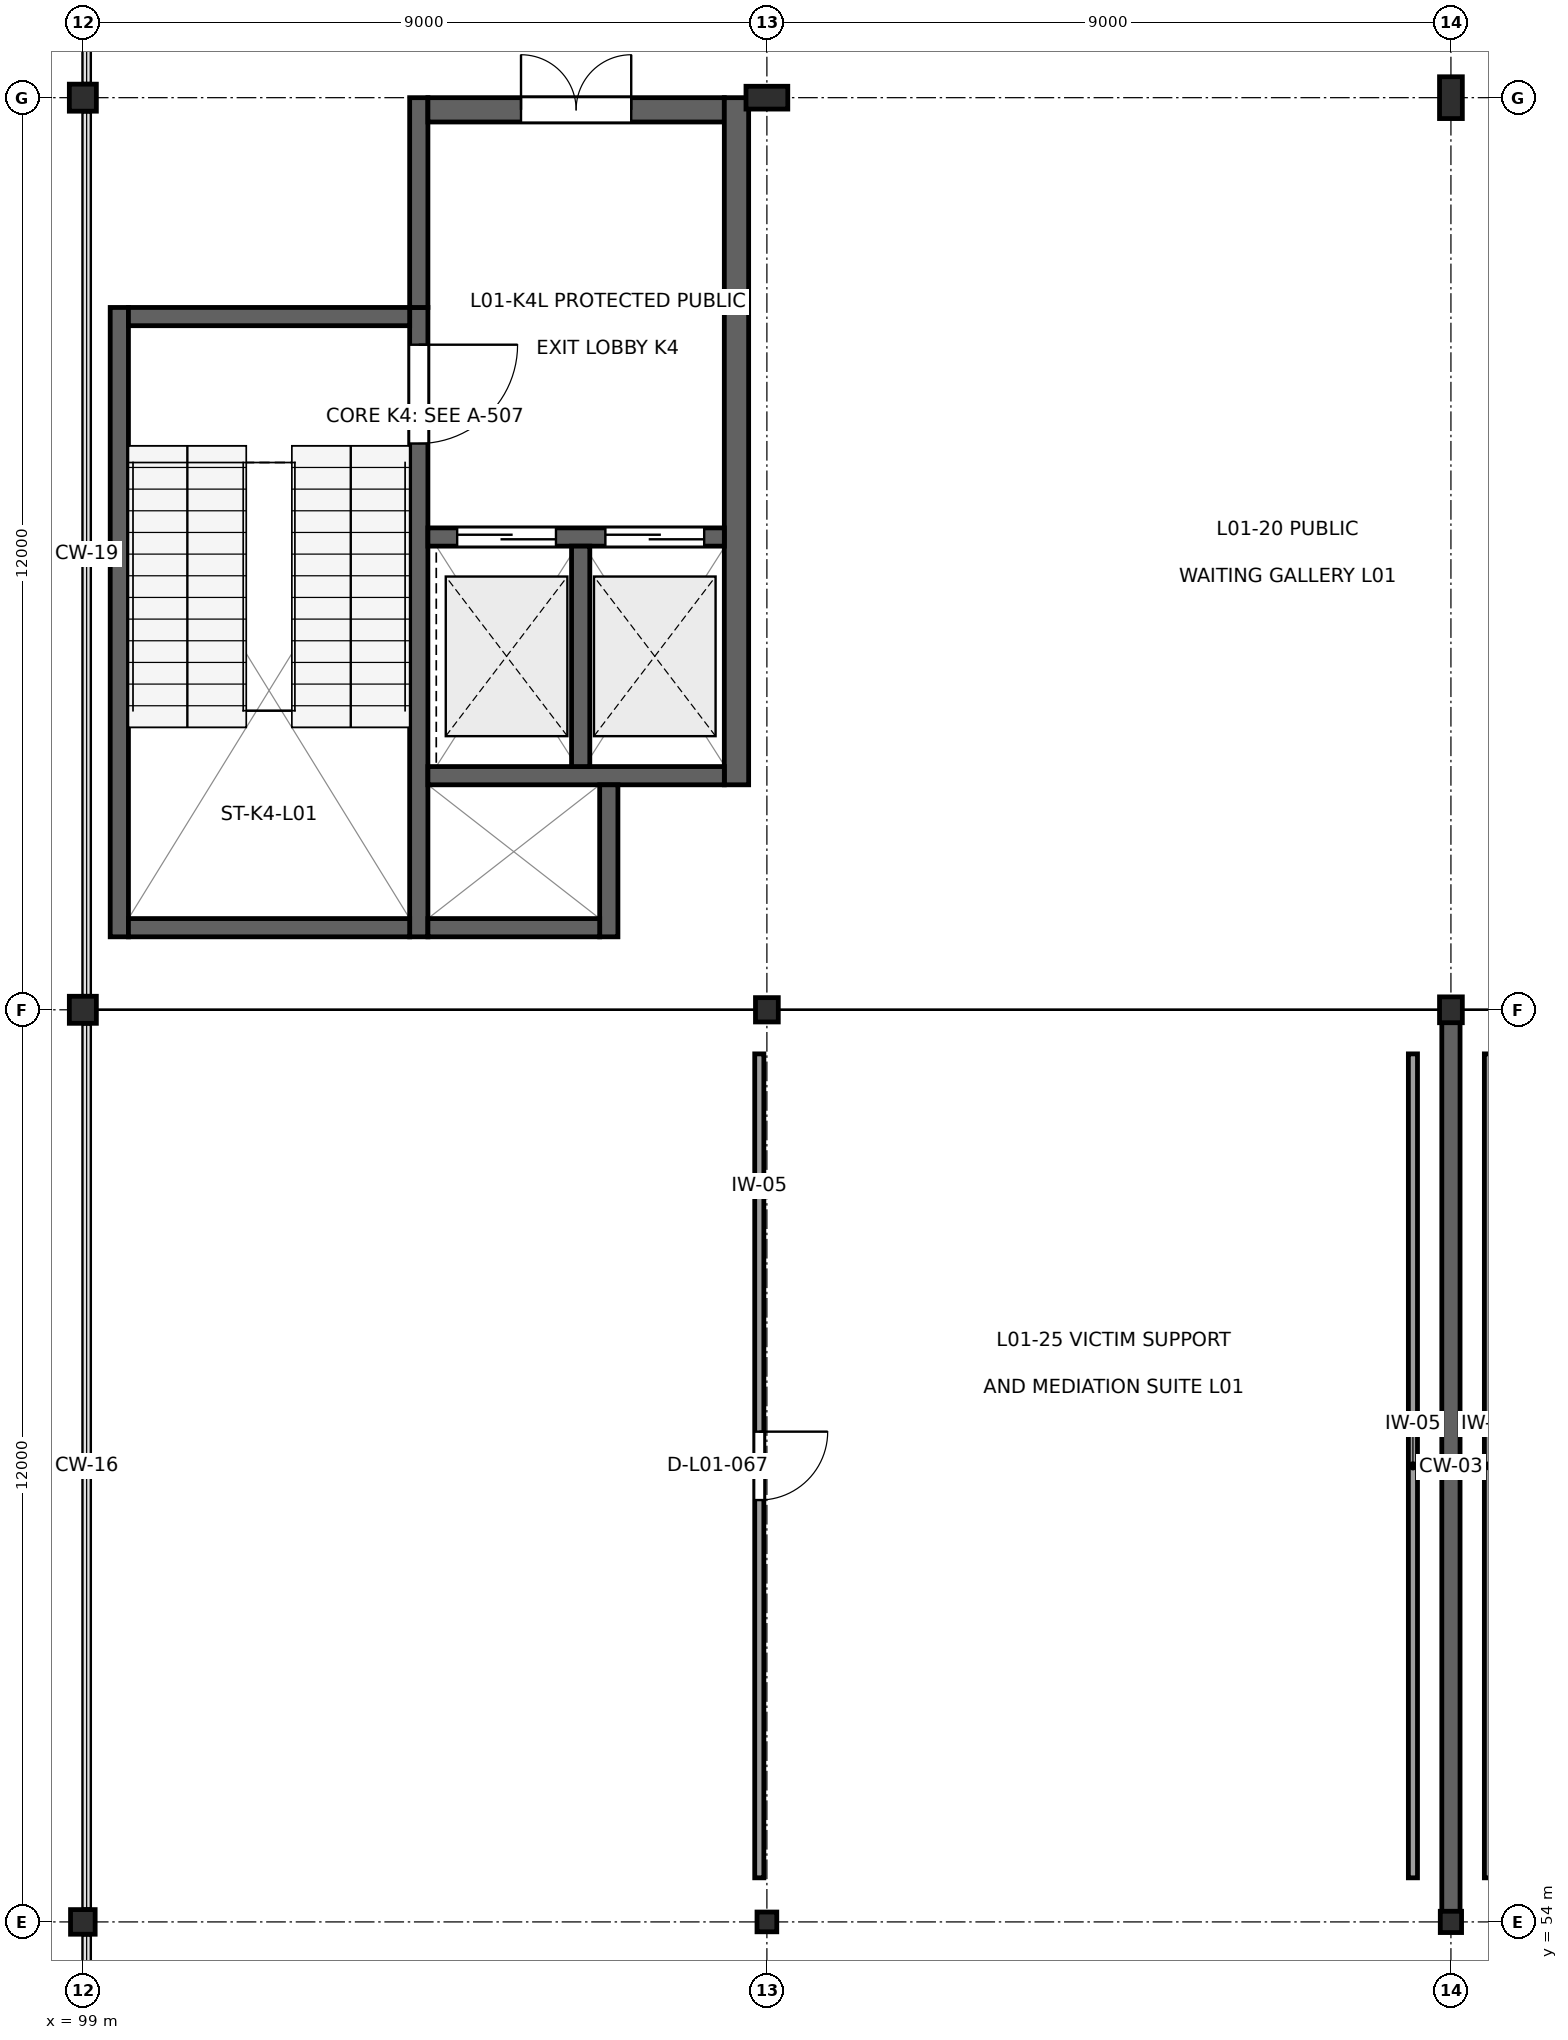
"""IFC4 building model, lengths in metres.
Left out: names, types, materials, properties, quantities, classifications, styles, units other than length and angle.
Written with IfcOpenShell. Run it as: python <this file> out.ifc"""

import sys

from ifc_helpers import new_model, si_unit, direction, frame, frame_2d, origin, origin_2d, place, context, subcontext, project, spatial, rectangle, hollow_circle, i_section, extrude, element, fill, save


model = new_model("IFC4")
c1 = context("Model", 3, precision=1e-05, world=origin(), true_north=direction((0.0, 1.0)))
c2 = subcontext(c1, "Body", "Model", "MODEL_VIEW")
j1 = project(units=[si_unit("LENGTHUNIT", "METRE"), si_unit("PLANEANGLEUNIT", "RADIAN")], contexts=[c1])
p1 = place(None, origin())
s1 = spatial("IfcSite", under=j1, at=p1, CompositionType="ELEMENT")
p2 = place(p1, origin())
s2 = spatial("IfcBuilding", under=s1, at=p2, CompositionType="ELEMENT")
p3 = place(p2, frame((0.0, 0.0, 5.4)))
s3 = spatial("IfcBuildingStorey", under=s2, at=p3, CompositionType="ELEMENT", Elevation=5.4)
p4 = place(p3, frame((99.0, 54.0, 0.0), z_axis=(0.0, 0.0, 1.0), x_axis=(1.0, 0.0, 0.0)))
e1 = element("IfcColumn", 1, at=p4, inside=s3, PredefinedType="PILASTER", context=c2, shape_type="SweptSolid", body=[
    extrude(hollow_circle(Radius=0.162, WallThickness=0.012, at=origin_2d()), origin(), (0.0, 0.0, 1.0), 4.5),
])
for number, where, z_axis, x_axis in (
    (2, (99.0, 66.0, 0.0), (0.0, 0.0, 1.0), (1.0, 0.0, 0.0)),
    (3, (99.0, 78.0, 0.0), (0.0, 0.0, 1.0), (1.0, 0.0, 0.0)),
):
    element("IfcColumn", number, at=place(p3, frame(where, z_axis=z_axis, x_axis=x_axis)), inside=s3, PredefinedType="PILASTER", context=c2, shape_type="SweptSolid", body=[
        extrude(hollow_circle(Radius=0.178, WallThickness=0.016, at=origin_2d()), origin(), (0.0, 0.0, 1.0), 4.5),
    ])
p5 = place(p3, frame((108.0, 54.0, 0.0), z_axis=(0.0, 0.0, 1.0), x_axis=(1.0, 0.0, 0.0)))
e4 = element("IfcColumn", 4, at=p5, inside=s3, PredefinedType="COLUMN", context=c2, shape_type="SweptSolid", body=[
    extrude(i_section(OverallWidth=0.26, OverallDepth=0.26, WebThickness=0.01, FlangeThickness=0.018, at=origin_2d()), origin(), (0.0, 0.0, 1.0), 4.5),
])
p6 = place(p3, frame((108.0, 66.0, 0.0), z_axis=(0.0, 0.0, 1.0), x_axis=(1.0, 0.0, 0.0)))
e5 = element("IfcColumn", 5, at=p6, inside=s3, PredefinedType="COLUMN", context=c2, shape_type="SweptSolid", body=[
    extrude(i_section(OverallWidth=0.3, OverallDepth=0.32, WebThickness=0.011, FlangeThickness=0.021, at=origin_2d()), origin(), (0.0, 0.0, 1.0), 4.5),
])
p7 = place(p3, frame((108.0, 78.0, 0.0), z_axis=(0.0, 0.0, 1.0), x_axis=(0.0, 1.0, 0.0)))
e6 = element("IfcColumn", 6, at=p7, inside=s3, PredefinedType="COLUMN", context=c2, shape_type="SweptSolid", body=[
    extrude(i_section(OverallWidth=0.3, OverallDepth=0.55, WebThickness=0.015, FlangeThickness=0.029, at=origin_2d()), origin(), (0.0, 0.0, 1.0), 4.5),
])
p8 = place(p3, frame((117.0, 54.0, 0.0), z_axis=(0.0, 0.0, 1.0), x_axis=(1.0, 0.0, 0.0)))
e7 = element("IfcColumn", 7, at=p8, inside=s3, PredefinedType="COLUMN", context=c2, shape_type="SweptSolid", body=[
    extrude(i_section(OverallWidth=0.28, OverallDepth=0.28, WebThickness=0.01, FlangeThickness=0.018, at=origin_2d()), origin(), (0.0, 0.0, 1.0), 4.5),
])
p9 = place(p3, frame((117.0, 66.0, 0.0), z_axis=(0.0, 0.0, 1.0), x_axis=(1.0, 0.0, 0.0)))
e8 = element("IfcColumn", 8, at=p9, inside=s3, PredefinedType="COLUMN", context=c2, shape_type="SweptSolid", body=[
    extrude(i_section(OverallWidth=0.3, OverallDepth=0.34, WebThickness=0.012, FlangeThickness=0.021, at=origin_2d()), origin(), (0.0, 0.0, 1.0), 4.5),
])
p10 = place(p3, frame((117.0, 78.0, 0.0), z_axis=(0.0, 0.0, 1.0), x_axis=(1.0, 0.0, 0.0)))
e9 = element("IfcColumn", 9, at=p10, inside=s3, PredefinedType="COLUMN", context=c2, shape_type="SweptSolid", body=[
    extrude(i_section(OverallWidth=0.3, OverallDepth=0.55, WebThickness=0.015, FlangeThickness=0.029, at=origin_2d()), origin(), (0.0, 0.0, 1.0), 4.5),
])
p11 = place(p3, frame((99.48, 66.96, 0.0), z_axis=(0.0, 0.0, 1.0), x_axis=(0.0, 1.0, 0.0)))
e10 = element("IfcWall", 10, at=p11, inside=s3, PredefinedType="SHEAR", context=c2, shape_type="SweptSolid", body=[
    extrude(rectangle(XDim=8.28, YDim=0.24, at=frame_2d((4.14, 0.0))), origin(), (0.0, 0.0, 1.0), 4.31),
])
p12 = place(p3, frame((103.42, 66.96, 0.0), z_axis=(0.0, 0.0, 1.0), x_axis=(0.0, 1.0, 0.0)))
e11 = element("IfcWall", 11, at=p12, inside=s3, PredefinedType="SHEAR", context=c2, shape_type="SweptSolid", body=[
    extrude(rectangle(XDim=8.28, YDim=0.24, at=frame_2d((4.14, 0.0))), origin(), (0.0, 0.0, 1.0), 4.31),
])
p13 = place(p12, frame((6.49, 0.0, 0.0)))
e12 = element("IfcOpeningElement", 12, at=p13, cuts=e11, PredefinedType="OPENING", context=c2, shape_type="SweptSolid", body=[
    extrude(rectangle(XDim=1.3, YDim=2.2, at=frame_2d((0.65, 1.1))), frame((0.0, 0.135, 0.0), z_axis=(0.0, -1.0, 0.0), x_axis=(1.0, 0.0, 0.0)), (0.0, 0.0, 1.0), 0.27),
])
for number, where, z_axis, x_axis in (
    (13, (99.6, 67.08, 0.0), (0.0, 0.0, 1.0), (1.0, 0.0, 0.0)),
    (14, (99.6, 75.12, 0.0), (0.0, 0.0, 1.0), (1.0, 0.0, 0.0)),
):
    element("IfcWall", number, at=place(p3, frame(where, z_axis=z_axis, x_axis=x_axis)), inside=s3, PredefinedType="SHEAR", context=c2, shape_type="SweptSolid", body=[
        extrude(rectangle(XDim=3.7, YDim=0.24, at=frame_2d((1.85, 0.0))), origin(), (0.0, 0.0, 1.0), 4.31),
    ])
p14 = place(p3, frame((103.42, 75.24, 0.0), z_axis=(0.0, 0.0, 1.0), x_axis=(0.0, 1.0, 0.0)))
e15 = element("IfcWall", 15, at=p14, inside=s3, PredefinedType="SHEAR", context=c2, shape_type="SweptSolid", body=[
    extrude(rectangle(XDim=2.76, YDim=0.24, at=frame_2d((1.38, 0.0))), origin(), (0.0, 0.0, 1.0), 4.16),
])
p15 = place(p3, frame((103.54, 77.84, 0.0), z_axis=(0.0, 0.0, 1.0), x_axis=(1.0, 0.0, 0.0)))
e16 = element("IfcWall", 16, at=p15, inside=s3, PredefinedType="SHEAR", context=c2, shape_type="SweptSolid", body=[
    extrude(rectangle(XDim=3.9, YDim=0.32, at=frame_2d((1.95, 0.0))), origin(), (0.0, 0.0, 1.0), 4.16),
])
p16 = place(p15, frame((1.225, 0.0, 0.0)))
e17 = element("IfcOpeningElement", 17, at=p16, cuts=e16, PredefinedType="OPENING", context=c2, shape_type="SweptSolid", body=[
    extrude(rectangle(XDim=1.45, YDim=2.2, at=frame_2d((0.725, 1.1))), frame((0.0, 0.175, 0.0), z_axis=(0.0, -1.0, 0.0), x_axis=(1.0, 0.0, 0.0)), (0.0, 0.0, 1.0), 0.35),
])
p17 = place(p3, frame((107.6, 68.96, 0.0), z_axis=(0.0, 0.0, 1.0), x_axis=(0.0, 1.0, 0.0)))
e18 = element("IfcWall", 18, at=p17, inside=s3, PredefinedType="SHEAR", context=c2, shape_type="SweptSolid", body=[
    extrude(rectangle(XDim=9.04, YDim=0.32, at=frame_2d((4.52, 0.0))), origin(), (0.0, 0.0, 1.0), 4.16),
])
p18 = place(p3, frame((103.54, 72.22, 0.0), z_axis=(0.0, 0.0, 1.0), x_axis=(1.0, 0.0, 0.0)))
e19 = element("IfcWall", 19, at=p18, inside=s3, PredefinedType="SHEAR", context=c2, shape_type="SweptSolid", body=[
    extrude(rectangle(XDim=3.9, YDim=0.24, at=frame_2d((1.95, 0.0))), origin(), (0.0, 0.0, 1.0), 4.31),
])
p19 = place(p18, frame((0.385, 0.0, 0.0)))
e20 = element("IfcOpeningElement", 20, at=p19, cuts=e19, PredefinedType="OPENING", context=c2, shape_type="SweptSolid", body=[
    extrude(rectangle(XDim=1.3, YDim=2.2, at=frame_2d((0.65, 1.1))), frame((0.0, 0.135, 0.0), z_axis=(0.0, -1.0, 0.0), x_axis=(1.0, 0.0, 0.0)), (0.0, 0.0, 1.0), 0.27),
])
p20 = place(p18, frame((2.335, 0.0, 0.0)))
e21 = element("IfcOpeningElement", 21, at=p20, cuts=e19, PredefinedType="OPENING", context=c2, shape_type="SweptSolid", body=[
    extrude(rectangle(XDim=1.3, YDim=2.2, at=frame_2d((0.65, 1.1))), frame((0.0, 0.135, 0.0), z_axis=(0.0, -1.0, 0.0), x_axis=(1.0, 0.0, 0.0)), (0.0, 0.0, 1.0), 0.27),
])
p21 = place(p3, frame((103.54, 69.08, 0.0), z_axis=(0.0, 0.0, 1.0), x_axis=(1.0, 0.0, 0.0)))
e22 = element("IfcWall", 22, at=p21, inside=s3, PredefinedType="SHEAR", context=c2, shape_type="SweptSolid", body=[
    extrude(rectangle(XDim=3.9, YDim=0.24, at=frame_2d((1.95, 0.0))), origin(), (0.0, 0.0, 1.0), 4.31),
])
p22 = place(p3, frame((105.55, 69.2, 0.0), z_axis=(0.0, 0.0, 1.0), x_axis=(0.0, 1.0, 0.0)))
e23 = element("IfcWall", 23, at=p22, inside=s3, PredefinedType="SHEAR", context=c2, shape_type="SweptSolid", body=[
    extrude(rectangle(XDim=2.9, YDim=0.24, at=frame_2d((1.45, 0.0))), origin(), (0.0, 0.0, 1.0), 4.31),
])
p23 = place(p3, frame((105.92, 66.96, 0.0), z_axis=(0.0, 0.0, 1.0), x_axis=(0.0, 1.0, 0.0)))
e24 = element("IfcWall", 24, at=p23, inside=s3, PredefinedType="SHEAR", context=c2, shape_type="SweptSolid", body=[
    extrude(rectangle(XDim=2.0, YDim=0.24, at=frame_2d((1.0, 0.0))), origin(), (0.0, 0.0, 1.0), 4.31),
])
p24 = place(p3, frame((103.54, 67.08, 0.0), z_axis=(0.0, 0.0, 1.0), x_axis=(1.0, 0.0, 0.0)))
e25 = element("IfcWall", 25, at=p24, inside=s3, PredefinedType="SHEAR", context=c2, shape_type="SweptSolid", body=[
    extrude(rectangle(XDim=2.26, YDim=0.24, at=frame_2d((1.13, 0.0))), origin(), (0.0, 0.0, 1.0), 4.31),
])
p25 = place(p3, frame((117.0, 54.138, 0.0), z_axis=(0.0, 0.0, 1.0), x_axis=(0.0, 1.0, 0.0)))
e26 = element("IfcWall", 26, at=p25, inside=s3, PredefinedType="SHEAR", context=c2, shape_type="SweptSolid", body=[
    extrude(rectangle(XDim=11.694, YDim=0.24, at=frame_2d((5.847, 0.0))), origin(), (0.0, 0.0, 1.0), 3.725),
])
p26 = place(p3, frame((107.9, 54.58, 0.0), z_axis=(0.0, 0.0, 1.0), x_axis=(0.0, 1.0, 0.0)))
e27 = element("IfcWall", 27, at=p26, inside=s3, PredefinedType="PARTITIONING", context=c2, shape_type="SweptSolid", body=[
    extrude(rectangle(XDim=10.84, YDim=0.12, at=frame_2d((5.42, 0.0))), origin(), (0.0, 0.0, 1.0), 3.775),
])
p27 = place(p26, frame((4.97, 0.0, 0.0)))
e28 = element("IfcOpeningElement", 28, at=p27, cuts=e27, PredefinedType="OPENING", context=c2, shape_type="SweptSolid", body=[
    extrude(rectangle(XDim=0.9, YDim=2.1, at=frame_2d((0.45, 1.05))), frame((0.0, 0.075, 0.0), z_axis=(0.0, -1.0, 0.0), x_axis=(1.0, 0.0, 0.0)), (0.0, 0.0, 1.0), 0.15),
])
for number, where, z_axis, x_axis in (
    (29, (116.5, 65.42, 0.0), (0.0, 0.0, 1.0), (0.0, -1.0, 0.0)),
    (30, (117.5, 54.58, 0.0), (0.0, 0.0, 1.0), (0.0, 1.0, 0.0)),
):
    element("IfcWall", number, at=place(p3, frame(where, z_axis=z_axis, x_axis=x_axis)), inside=s3, PredefinedType="PARTITIONING", context=c2, shape_type="SweptSolid", body=[
        extrude(rectangle(XDim=10.84, YDim=0.12, at=frame_2d((5.42, 0.0))), origin(), (0.0, 0.0, 1.0), 4.14),
    ])
p28 = place(p13, frame((1.3, 0.0, 0.0), z_axis=(0.0, 0.0, 1.0), x_axis=(-1.0, 0.0, 0.0)))
e31 = element("IfcDoor", 31, at=p28, inside=s3, OperationType="SINGLE_SWING_RIGHT", PredefinedType="DOOR", context=c2, shape_type="SweptSolid", body=[
    extrude(rectangle(XDim=1.3, YDim=2.2, at=frame_2d((0.65, 1.1))), frame((0.0, 0.025, 0.0), z_axis=(0.0, -1.0, 0.0), x_axis=(1.0, 0.0, 0.0)), (0.0, 0.0, 1.0), 0.05),
])
fill(e12, e31)
p29 = place(p16, origin())
e32 = element("IfcDoor", 32, at=p29, inside=s3, OperationType="DOUBLE_DOOR_SINGLE_SWING", PredefinedType="DOOR", context=c2, shape_type="SweptSolid", body=[
    extrude(rectangle(XDim=1.45, YDim=2.2, at=frame_2d((0.725, 1.1))), frame((0.0, 0.025, 0.0), z_axis=(0.0, -1.0, 0.0), x_axis=(1.0, 0.0, 0.0)), (0.0, 0.0, 1.0), 0.05),
])
fill(e17, e32)
p30 = place(p19, origin())
e33 = element("IfcDoor", 33, at=p30, inside=s3, OperationType="DOUBLE_DOOR_SLIDING", PredefinedType="DOOR", context=c2, shape_type="SweptSolid", body=[
    extrude(rectangle(XDim=1.3, YDim=2.2, at=frame_2d((0.65, 1.1))), frame((0.0, 0.025, 0.0), z_axis=(0.0, -1.0, 0.0), x_axis=(1.0, 0.0, 0.0)), (0.0, 0.0, 1.0), 0.05),
])
fill(e20, e33)
p31 = place(p20, origin())
e34 = element("IfcDoor", 34, at=p31, inside=s3, OperationType="DOUBLE_DOOR_SLIDING", PredefinedType="DOOR", context=c2, shape_type="SweptSolid", body=[
    extrude(rectangle(XDim=1.3, YDim=2.2, at=frame_2d((0.65, 1.1))), frame((0.0, 0.025, 0.0), z_axis=(0.0, -1.0, 0.0), x_axis=(1.0, 0.0, 0.0)), (0.0, 0.0, 1.0), 0.05),
])
fill(e21, e34)
p32 = place(p27, frame((0.9, 0.0, 0.0), z_axis=(0.0, 0.0, 1.0), x_axis=(-1.0, 0.0, 0.0)))
e35 = element("IfcDoor", 35, at=p32, inside=s3, OperationType="SINGLE_SWING_RIGHT", PredefinedType="DOOR", context=c2, shape_type="SweptSolid", body=[
    extrude(rectangle(XDim=0.9, YDim=2.1, at=frame_2d((0.45, 1.05))), frame((0.0, 0.025, 0.0), z_axis=(0.0, -1.0, 0.0), x_axis=(1.0, 0.0, 0.0)), (0.0, 0.0, 1.0), 0.05),
])
fill(e28, e35)
save(model, sys.argv[1])
